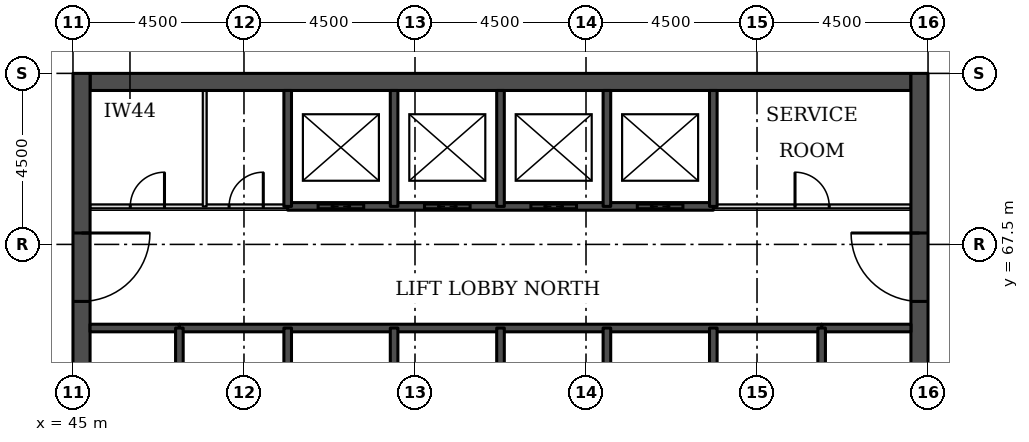
"""IFC4 building model, lengths in metres.
Left out: names, types, materials, properties, quantities, classifications, styles, units other than length and angle.
Written with IfcOpenShell. Run it as: python <this file> out.ifc"""

import sys

from ifc_helpers import new_model, si_unit, direction, frame, frame_2d, origin, place, context, subcontext, project, spatial, rectangle, extrude, element, fill, save


model = new_model("IFC4")
c1 = context("Model", 3, precision=1e-05, world=origin(), true_north=direction((0.0, 1.0)))
c2 = subcontext(c1, "Body", "Model", "MODEL_VIEW")
j1 = project(units=[si_unit("LENGTHUNIT", "METRE"), si_unit("PLANEANGLEUNIT", "RADIAN")], contexts=[c1])
p1 = place(None, origin())
s1 = spatial("IfcSite", under=j1, at=p1, CompositionType="ELEMENT")
p2 = place(p1, origin())
s2 = spatial("IfcBuilding", under=s1, at=p2, CompositionType="ELEMENT")
p3 = place(p2, frame((0.0, 0.0, 78.9)))
s3 = spatial("IfcBuildingStorey", under=s2, at=p3, CompositionType="ELEMENT", Elevation=78.9)
p4 = place(p3, frame((45.45, 71.775, 0.0), z_axis=(0.0, 0.0, 1.0), x_axis=(1.0, 0.0, 0.0)))
e1 = element("IfcWall", 1, at=p4, inside=s3, PredefinedType="SHEAR", context=c2, shape_type="SweptSolid", body=[
    extrude(rectangle(XDim=21.6, YDim=0.45, at=frame_2d((10.8, 0.0))), origin(), (0.0, 0.0, 1.0), 3.7),
])
p5 = place(p3, frame((45.225, 49.5, 0.0), z_axis=(0.0, 0.0, 1.0), x_axis=(0.0, 1.0, 0.0)))
e2 = element("IfcWall", 2, at=p5, inside=s3, PredefinedType="SHEAR", context=c2, shape_type="SweptSolid", body=[
    extrude(rectangle(XDim=22.5, YDim=0.45, at=frame_2d((11.25, 0.0))), origin(), (0.0, 0.0, 1.0), 3.7),
])
p6 = place(p5, frame((4.2, 0.0, 0.0)))
e3 = element("IfcOpeningElement", 3, at=p6, cuts=e2, PredefinedType="OPENING", context=c2, shape_type="SweptSolid", body=[
    extrude(rectangle(XDim=1.8, YDim=2.1, at=frame_2d((0.9, 1.05))), frame((0.0, 0.235, 0.0), z_axis=(0.0, -1.0, 0.0), x_axis=(1.0, 0.0, 0.0)), (0.0, 0.0, 1.0), 0.47),
])
p7 = place(p5, frame((6.9, 0.0, 0.0)))
e4 = element("IfcOpeningElement", 4, at=p7, cuts=e2, PredefinedType="OPENING", context=c2, shape_type="SweptSolid", body=[
    extrude(rectangle(XDim=1.1, YDim=2.1, at=frame_2d((0.55, 1.05))), frame((0.0, 0.235, 0.0), z_axis=(0.0, -1.0, 0.0), x_axis=(1.0, 0.0, 0.0)), (0.0, 0.0, 1.0), 0.47),
])
p8 = place(p5, frame((13.6, 0.0, 0.0)))
e5 = element("IfcOpeningElement", 5, at=p8, cuts=e2, PredefinedType="OPENING", context=c2, shape_type="SweptSolid", body=[
    extrude(rectangle(XDim=1.1, YDim=2.1, at=frame_2d((0.55, 1.05))), frame((0.0, 0.235, 0.0), z_axis=(0.0, -1.0, 0.0), x_axis=(1.0, 0.0, 0.0)), (0.0, 0.0, 1.0), 0.47),
])
p9 = place(p5, frame((16.5, 0.0, 0.0)))
e6 = element("IfcOpeningElement", 6, at=p9, cuts=e2, PredefinedType="OPENING", context=c2, shape_type="SweptSolid", body=[
    extrude(rectangle(XDim=1.8, YDim=2.1, at=frame_2d((0.9, 1.05))), frame((0.0, 0.235, 0.0), z_axis=(0.0, -1.0, 0.0), x_axis=(1.0, 0.0, 0.0)), (0.0, 0.0, 1.0), 0.47),
])
p10 = place(p3, frame((67.275, 49.5, 0.0), z_axis=(0.0, 0.0, 1.0), x_axis=(0.0, 1.0, 0.0)))
e7 = element("IfcWall", 7, at=p10, inside=s3, PredefinedType="SHEAR", context=c2, shape_type="SweptSolid", body=[
    extrude(rectangle(XDim=22.5, YDim=0.45, at=frame_2d((11.25, 0.0))), origin(), (0.0, 0.0, 1.0), 3.7),
])
p11 = place(p10, frame((4.2, 0.0, 0.0)))
e8 = element("IfcOpeningElement", 8, at=p11, cuts=e7, PredefinedType="OPENING", context=c2, shape_type="SweptSolid", body=[
    extrude(rectangle(XDim=1.8, YDim=2.1, at=frame_2d((0.9, 1.05))), frame((0.0, 0.235, 0.0), z_axis=(0.0, -1.0, 0.0), x_axis=(1.0, 0.0, 0.0)), (0.0, 0.0, 1.0), 0.47),
])
p12 = place(p10, frame((6.9, 0.0, 0.0)))
e9 = element("IfcOpeningElement", 9, at=p12, cuts=e7, PredefinedType="OPENING", context=c2, shape_type="SweptSolid", body=[
    extrude(rectangle(XDim=1.1, YDim=2.1, at=frame_2d((0.55, 1.05))), frame((0.0, 0.235, 0.0), z_axis=(0.0, -1.0, 0.0), x_axis=(1.0, 0.0, 0.0)), (0.0, 0.0, 1.0), 0.47),
])
p13 = place(p10, frame((13.6, 0.0, 0.0)))
e10 = element("IfcOpeningElement", 10, at=p13, cuts=e7, PredefinedType="OPENING", context=c2, shape_type="SweptSolid", body=[
    extrude(rectangle(XDim=1.1, YDim=2.1, at=frame_2d((0.55, 1.05))), frame((0.0, 0.235, 0.0), z_axis=(0.0, -1.0, 0.0), x_axis=(1.0, 0.0, 0.0)), (0.0, 0.0, 1.0), 0.47),
])
p14 = place(p10, frame((16.5, 0.0, 0.0)))
e11 = element("IfcOpeningElement", 11, at=p14, cuts=e7, PredefinedType="OPENING", context=c2, shape_type="SweptSolid", body=[
    extrude(rectangle(XDim=1.8, YDim=2.1, at=frame_2d((0.9, 1.05))), frame((0.0, 0.235, 0.0), z_axis=(0.0, -1.0, 0.0), x_axis=(1.0, 0.0, 0.0)), (0.0, 0.0, 1.0), 0.47),
])
for number, where, z_axis, x_axis in (
    (12, (45.45, 65.3, 0.0), (0.0, 0.0, 1.0), (1.0, 0.0, 0.0)),
    (13, (64.7, 65.3, 0.0), (0.0, 0.0, 1.0), (1.0, 0.0, 0.0)),
):
    element("IfcWall", number, at=place(p3, frame(where, z_axis=z_axis, x_axis=x_axis)), inside=s3, PredefinedType="SOLIDWALL", context=c2, shape_type="SweptSolid", body=[
        extrude(rectangle(XDim=2.35, YDim=0.2, at=frame_2d((1.175, 0.0))), origin(), (0.0, 0.0, 1.0), 3.55),
    ])
p15 = place(p3, frame((47.8, 65.3, 0.0), z_axis=(0.0, 0.0, 1.0), x_axis=(1.0, 0.0, 0.0)))
e14 = element("IfcWall", 14, at=p15, inside=s3, PredefinedType="SOLIDWALL", context=c2, shape_type="SweptSolid", body=[
    extrude(rectangle(XDim=16.9, YDim=0.2, at=frame_2d((8.45, 0.0))), origin(), (0.0, 0.0, 1.0), 3.55),
])
p16 = place(p3, frame((45.45, 68.5, 0.0), z_axis=(0.0, 0.0, 1.0), x_axis=(1.0, 0.0, 0.0)))
e15 = element("IfcWall", 15, at=p16, inside=s3, PredefinedType="PARTITIONING", context=c2, shape_type="SweptSolid", body=[
    extrude(rectangle(XDim=5.2, YDim=0.1, at=frame_2d((2.6, 0.0))), origin(), (0.0, 0.0, 1.0), 3.55),
])
p17 = place(p16, frame((1.058, 0.0, 0.0)))
e16 = element("IfcOpeningElement", 16, at=p17, cuts=e15, PredefinedType="OPENING", context=c2, shape_type="SweptSolid", body=[
    extrude(rectangle(XDim=0.9, YDim=2.1, at=frame_2d((0.45, 1.05))), frame((0.0, 0.06, 0.0), z_axis=(0.0, -1.0, 0.0), x_axis=(1.0, 0.0, 0.0)), (0.0, 0.0, 1.0), 0.12),
])
p18 = place(p16, frame((3.658, 0.0, 0.0)))
e17 = element("IfcOpeningElement", 17, at=p18, cuts=e15, PredefinedType="OPENING", context=c2, shape_type="SweptSolid", body=[
    extrude(rectangle(XDim=0.9, YDim=2.1, at=frame_2d((0.45, 1.05))), frame((0.0, 0.06, 0.0), z_axis=(0.0, -1.0, 0.0), x_axis=(1.0, 0.0, 0.0)), (0.0, 0.0, 1.0), 0.12),
])
p19 = place(p3, frame((61.85, 68.5, 0.0), z_axis=(0.0, 0.0, 1.0), x_axis=(1.0, 0.0, 0.0)))
e18 = element("IfcWall", 18, at=p19, inside=s3, PredefinedType="PARTITIONING", context=c2, shape_type="SweptSolid", body=[
    extrude(rectangle(XDim=5.2, YDim=0.1, at=frame_2d((2.6, 0.0))), origin(), (0.0, 0.0, 1.0), 3.55),
])
p20 = place(p19, frame((2.15, 0.0, 0.0)))
e19 = element("IfcOpeningElement", 19, at=p20, cuts=e18, PredefinedType="OPENING", context=c2, shape_type="SweptSolid", body=[
    extrude(rectangle(XDim=0.9, YDim=2.1, at=frame_2d((0.45, 1.05))), frame((0.0, 0.06, 0.0), z_axis=(0.0, -1.0, 0.0), x_axis=(1.0, 0.0, 0.0)), (0.0, 0.0, 1.0), 0.12),
])
p21 = place(p3, frame((50.65, 68.5, 0.0), z_axis=(0.0, 0.0, 1.0), x_axis=(1.0, 0.0, 0.0)))
e20 = element("IfcWall", 20, at=p21, inside=s3, PredefinedType="SOLIDWALL", context=c2, shape_type="SweptSolid", body=[
    extrude(rectangle(XDim=11.2, YDim=0.2, at=frame_2d((5.6, 0.0))), origin(), (0.0, 0.0, 1.0), 3.55),
])
p22 = place(p21, frame((0.8, 0.0, 0.0)))
e21 = element("IfcOpeningElement", 21, at=p22, cuts=e20, PredefinedType="OPENING", context=c2, shape_type="SweptSolid", body=[
    extrude(rectangle(XDim=1.2, YDim=2.1, at=frame_2d((0.6, 1.05))), frame((0.0, 0.11, 0.0), z_axis=(0.0, -1.0, 0.0), x_axis=(1.0, 0.0, 0.0)), (0.0, 0.0, 1.0), 0.22),
])
p23 = place(p21, frame((3.6, 0.0, 0.0)))
e22 = element("IfcOpeningElement", 22, at=p23, cuts=e20, PredefinedType="OPENING", context=c2, shape_type="SweptSolid", body=[
    extrude(rectangle(XDim=1.2, YDim=2.1, at=frame_2d((0.6, 1.05))), frame((0.0, 0.11, 0.0), z_axis=(0.0, -1.0, 0.0), x_axis=(1.0, 0.0, 0.0)), (0.0, 0.0, 1.0), 0.22),
])
p24 = place(p21, frame((6.4, 0.0, 0.0)))
e23 = element("IfcOpeningElement", 23, at=p24, cuts=e20, PredefinedType="OPENING", context=c2, shape_type="SweptSolid", body=[
    extrude(rectangle(XDim=1.2, YDim=2.1, at=frame_2d((0.6, 1.05))), frame((0.0, 0.11, 0.0), z_axis=(0.0, -1.0, 0.0), x_axis=(1.0, 0.0, 0.0)), (0.0, 0.0, 1.0), 0.22),
])
p25 = place(p21, frame((9.2, 0.0, 0.0)))
e24 = element("IfcOpeningElement", 24, at=p25, cuts=e20, PredefinedType="OPENING", context=c2, shape_type="SweptSolid", body=[
    extrude(rectangle(XDim=1.2, YDim=2.1, at=frame_2d((0.6, 1.05))), frame((0.0, 0.11, 0.0), z_axis=(0.0, -1.0, 0.0), x_axis=(1.0, 0.0, 0.0)), (0.0, 0.0, 1.0), 0.22),
])
p26 = place(p3, frame((47.8, 62.0, 0.0), z_axis=(0.0, 0.0, 1.0), x_axis=(0.0, 1.0, 0.0)))
e25 = element("IfcWall", 25, at=p26, inside=s3, PredefinedType="SOLIDWALL", context=c2, shape_type="SweptSolid", body=[
    extrude(rectangle(XDim=3.3, YDim=0.2, at=frame_2d((1.65, 0.0))), origin(), (0.0, 0.0, 1.0), 3.55),
])
p27 = place(p26, frame((1.1, 0.0, 0.0)))
e26 = element("IfcOpeningElement", 26, at=p27, cuts=e25, PredefinedType="OPENING", context=c2, shape_type="SweptSolid", body=[
    extrude(rectangle(XDim=1.1, YDim=2.1, at=frame_2d((0.55, 1.05))), frame((0.0, 0.11, 0.0), z_axis=(0.0, -1.0, 0.0), x_axis=(1.0, 0.0, 0.0)), (0.0, 0.0, 1.0), 0.22),
])
p28 = place(p3, frame((48.466, 68.5, 0.0), z_axis=(0.0, 0.0, 1.0), x_axis=(0.0, 1.0, 0.0)))
e27 = element("IfcWall", 27, at=p28, inside=s3, PredefinedType="PARTITIONING", context=c2, shape_type="SweptSolid", body=[
    extrude(rectangle(XDim=3.05, YDim=0.1, at=frame_2d((1.525, 0.0))), origin(), (0.0, 0.0, 1.0), 3.55),
])
p29 = place(p3, frame((50.65, 62.0, 0.0), z_axis=(0.0, 0.0, 1.0), x_axis=(0.0, 1.0, 0.0)))
e28 = element("IfcWall", 28, at=p29, inside=s3, PredefinedType="SOLIDWALL", context=c2, shape_type="SweptSolid", body=[
    extrude(rectangle(XDim=3.3, YDim=0.2, at=frame_2d((1.65, 0.0))), origin(), (0.0, 0.0, 1.0), 3.55),
])
p30 = place(p3, frame((50.65, 68.5, 0.0), z_axis=(0.0, 0.0, 1.0), x_axis=(0.0, 1.0, 0.0)))
e29 = element("IfcWall", 29, at=p30, inside=s3, PredefinedType="SOLIDWALL", context=c2, shape_type="SweptSolid", body=[
    extrude(rectangle(XDim=3.05, YDim=0.2, at=frame_2d((1.525, 0.0))), origin(), (0.0, 0.0, 1.0), 3.55),
])
p31 = place(p3, frame((53.45, 62.5, 0.0), z_axis=(0.0, 0.0, 1.0), x_axis=(0.0, 1.0, 0.0)))
e30 = element("IfcWall", 30, at=p31, inside=s3, PredefinedType="SOLIDWALL", context=c2, shape_type="SweptSolid", body=[
    extrude(rectangle(XDim=2.8, YDim=0.2, at=frame_2d((1.4, 0.0))), origin(), (0.0, 0.0, 1.0), 3.55),
])
p32 = place(p3, frame((53.45, 68.5, 0.0), z_axis=(0.0, 0.0, 1.0), x_axis=(0.0, 1.0, 0.0)))
e31 = element("IfcWall", 31, at=p32, inside=s3, PredefinedType="SOLIDWALL", context=c2, shape_type="SweptSolid", body=[
    extrude(rectangle(XDim=3.05, YDim=0.2, at=frame_2d((1.525, 0.0))), origin(), (0.0, 0.0, 1.0), 3.55),
])
p33 = place(p3, frame((56.25, 62.5, 0.0), z_axis=(0.0, 0.0, 1.0), x_axis=(0.0, 1.0, 0.0)))
e32 = element("IfcWall", 32, at=p33, inside=s3, PredefinedType="SOLIDWALL", context=c2, shape_type="SweptSolid", body=[
    extrude(rectangle(XDim=2.8, YDim=0.2, at=frame_2d((1.4, 0.0))), origin(), (0.0, 0.0, 1.0), 3.55),
])
p34 = place(p3, frame((56.25, 68.5, 0.0), z_axis=(0.0, 0.0, 1.0), x_axis=(0.0, 1.0, 0.0)))
e33 = element("IfcWall", 33, at=p34, inside=s3, PredefinedType="SOLIDWALL", context=c2, shape_type="SweptSolid", body=[
    extrude(rectangle(XDim=3.05, YDim=0.2, at=frame_2d((1.525, 0.0))), origin(), (0.0, 0.0, 1.0), 3.55),
])
p35 = place(p3, frame((59.05, 62.5, 0.0), z_axis=(0.0, 0.0, 1.0), x_axis=(0.0, 1.0, 0.0)))
e34 = element("IfcWall", 34, at=p35, inside=s3, PredefinedType="SOLIDWALL", context=c2, shape_type="SweptSolid", body=[
    extrude(rectangle(XDim=2.8, YDim=0.2, at=frame_2d((1.4, 0.0))), origin(), (0.0, 0.0, 1.0), 3.55),
])
p36 = place(p3, frame((59.05, 68.5, 0.0), z_axis=(0.0, 0.0, 1.0), x_axis=(0.0, 1.0, 0.0)))
e35 = element("IfcWall", 35, at=p36, inside=s3, PredefinedType="SOLIDWALL", context=c2, shape_type="SweptSolid", body=[
    extrude(rectangle(XDim=3.05, YDim=0.2, at=frame_2d((1.525, 0.0))), origin(), (0.0, 0.0, 1.0), 3.55),
])
p37 = place(p3, frame((61.85, 62.0, 0.0), z_axis=(0.0, 0.0, 1.0), x_axis=(0.0, 1.0, 0.0)))
e36 = element("IfcWall", 36, at=p37, inside=s3, PredefinedType="SOLIDWALL", context=c2, shape_type="SweptSolid", body=[
    extrude(rectangle(XDim=3.3, YDim=0.2, at=frame_2d((1.65, 0.0))), origin(), (0.0, 0.0, 1.0), 3.55),
])
p38 = place(p3, frame((61.85, 68.5, 0.0), z_axis=(0.0, 0.0, 1.0), x_axis=(0.0, 1.0, 0.0)))
e37 = element("IfcWall", 37, at=p38, inside=s3, PredefinedType="SOLIDWALL", context=c2, shape_type="SweptSolid", body=[
    extrude(rectangle(XDim=3.05, YDim=0.2, at=frame_2d((1.525, 0.0))), origin(), (0.0, 0.0, 1.0), 3.55),
])
p39 = place(p3, frame((64.7, 62.0, 0.0), z_axis=(0.0, 0.0, 1.0), x_axis=(0.0, 1.0, 0.0)))
e38 = element("IfcWall", 38, at=p39, inside=s3, PredefinedType="SOLIDWALL", context=c2, shape_type="SweptSolid", body=[
    extrude(rectangle(XDim=3.3, YDim=0.2, at=frame_2d((1.65, 0.0))), origin(), (0.0, 0.0, 1.0), 3.55),
])
p40 = place(p39, frame((1.1, 0.0, 0.0)))
e39 = element("IfcOpeningElement", 39, at=p40, cuts=e38, PredefinedType="OPENING", context=c2, shape_type="SweptSolid", body=[
    extrude(rectangle(XDim=1.1, YDim=2.1, at=frame_2d((0.55, 1.05))), frame((0.0, 0.11, 0.0), z_axis=(0.0, -1.0, 0.0), x_axis=(1.0, 0.0, 0.0)), (0.0, 0.0, 1.0), 0.22),
])
p41 = place(p22, origin())
e40 = element("IfcDoor", 40, at=p41, inside=s3, OperationType="DOUBLE_DOOR_SLIDING", PredefinedType="DOOR", context=c2, shape_type="SweptSolid", body=[
    extrude(rectangle(XDim=1.2, YDim=2.1, at=frame_2d((0.6, 1.05))), frame((0.0, 0.025, 0.0), z_axis=(0.0, -1.0, 0.0), x_axis=(1.0, 0.0, 0.0)), (0.0, 0.0, 1.0), 0.05),
])
fill(e21, e40)
p42 = place(p23, origin())
e41 = element("IfcDoor", 41, at=p42, inside=s3, OperationType="DOUBLE_DOOR_SLIDING", PredefinedType="DOOR", context=c2, shape_type="SweptSolid", body=[
    extrude(rectangle(XDim=1.2, YDim=2.1, at=frame_2d((0.6, 1.05))), frame((0.0, 0.025, 0.0), z_axis=(0.0, -1.0, 0.0), x_axis=(1.0, 0.0, 0.0)), (0.0, 0.0, 1.0), 0.05),
])
fill(e22, e41)
p43 = place(p24, origin())
e42 = element("IfcDoor", 42, at=p43, inside=s3, OperationType="DOUBLE_DOOR_SLIDING", PredefinedType="DOOR", context=c2, shape_type="SweptSolid", body=[
    extrude(rectangle(XDim=1.2, YDim=2.1, at=frame_2d((0.6, 1.05))), frame((0.0, 0.025, 0.0), z_axis=(0.0, -1.0, 0.0), x_axis=(1.0, 0.0, 0.0)), (0.0, 0.0, 1.0), 0.05),
])
fill(e23, e42)
p44 = place(p25, origin())
e43 = element("IfcDoor", 43, at=p44, inside=s3, OperationType="DOUBLE_DOOR_SLIDING", PredefinedType="DOOR", context=c2, shape_type="SweptSolid", body=[
    extrude(rectangle(XDim=1.2, YDim=2.1, at=frame_2d((0.6, 1.05))), frame((0.0, 0.025, 0.0), z_axis=(0.0, -1.0, 0.0), x_axis=(1.0, 0.0, 0.0)), (0.0, 0.0, 1.0), 0.05),
])
fill(e24, e43)
p45 = place(p9, frame((1.8, 0.0, 0.0), z_axis=(0.0, 0.0, 1.0), x_axis=(-1.0, 0.0, 0.0)))
e44 = element("IfcDoor", 44, at=p45, inside=s3, OperationType="SINGLE_SWING_LEFT", PredefinedType="DOOR", context=c2, shape_type="SweptSolid", body=[
    extrude(rectangle(XDim=1.8, YDim=2.1, at=frame_2d((0.9, 1.05))), frame((0.0, 0.025, 0.0), z_axis=(0.0, -1.0, 0.0), x_axis=(1.0, 0.0, 0.0)), (0.0, 0.0, 1.0), 0.05),
])
fill(e6, e44)
p46 = place(p14, origin())
e45 = element("IfcDoor", 45, at=p46, inside=s3, OperationType="SINGLE_SWING_RIGHT", PredefinedType="DOOR", context=c2, shape_type="SweptSolid", body=[
    extrude(rectangle(XDim=1.8, YDim=2.1, at=frame_2d((0.9, 1.05))), frame((0.0, 0.025, 0.0), z_axis=(0.0, -1.0, 0.0), x_axis=(1.0, 0.0, 0.0)), (0.0, 0.0, 1.0), 0.05),
])
fill(e11, e45)
p47 = place(p20, origin())
e46 = element("IfcDoor", 46, at=p47, inside=s3, OperationType="SINGLE_SWING_LEFT", PredefinedType="DOOR", context=c2, shape_type="SweptSolid", body=[
    extrude(rectangle(XDim=0.9, YDim=2.1, at=frame_2d((0.45, 1.05))), frame((0.0, 0.025, 0.0), z_axis=(0.0, -1.0, 0.0), x_axis=(1.0, 0.0, 0.0)), (0.0, 0.0, 1.0), 0.05),
])
fill(e19, e46)
p48 = place(p17, origin())
e47 = element("IfcDoor", 47, at=p48, inside=s3, OperationType="SINGLE_SWING_RIGHT", PredefinedType="DOOR", context=c2, shape_type="SweptSolid", body=[
    extrude(rectangle(XDim=0.9, YDim=2.1, at=frame_2d((0.45, 1.05))), frame((0.0, 0.025, 0.0), z_axis=(0.0, -1.0, 0.0), x_axis=(1.0, 0.0, 0.0)), (0.0, 0.0, 1.0), 0.05),
])
fill(e16, e47)
p49 = place(p18, origin())
e48 = element("IfcDoor", 48, at=p49, inside=s3, OperationType="SINGLE_SWING_RIGHT", PredefinedType="DOOR", context=c2, shape_type="SweptSolid", body=[
    extrude(rectangle(XDim=0.9, YDim=2.1, at=frame_2d((0.45, 1.05))), frame((0.0, 0.025, 0.0), z_axis=(0.0, -1.0, 0.0), x_axis=(1.0, 0.0, 0.0)), (0.0, 0.0, 1.0), 0.05),
])
fill(e17, e48)
save(model, sys.argv[1])
